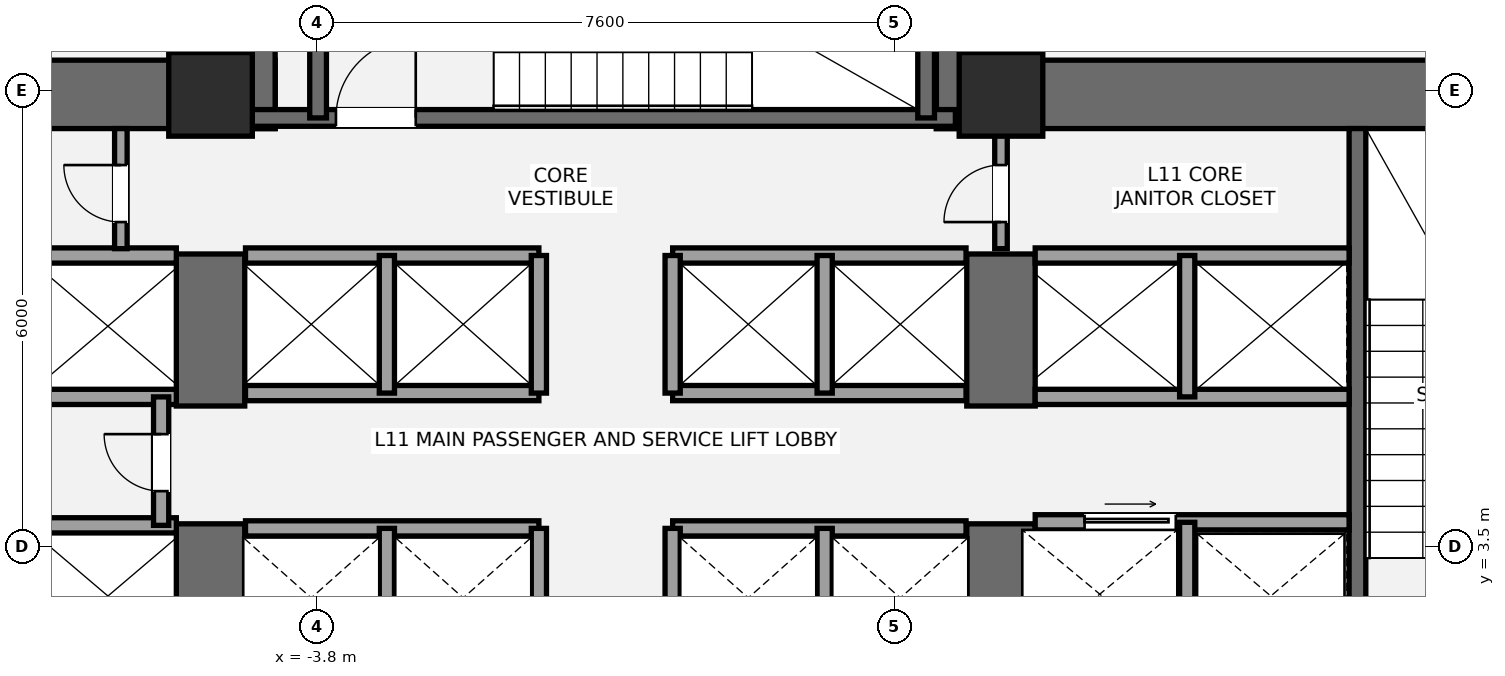
"""IFC4 building model, lengths in metres.
Left out: names, types, materials, properties, quantities, classifications, styles, units other than length and angle.
Written with IfcOpenShell. Run it as: python <this file> out.ifc"""

import sys

from ifc_helpers import new_model, si_unit, direction, frame, frame_2d, origin, origin_2d, place, context, subcontext, project, spatial, rectangle, extrude, element, fill, save


model = new_model("IFC4")
c1 = context("Model", 3, precision=1e-05, world=origin(), true_north=direction((0.0, 1.0)))
c2 = subcontext(c1, "Body", "Model", "MODEL_VIEW")
j1 = project(units=[si_unit("LENGTHUNIT", "METRE"), si_unit("PLANEANGLEUNIT", "RADIAN")], contexts=[c1])
p1 = place(None, origin())
s1 = spatial("IfcSite", under=j1, at=p1, CompositionType="ELEMENT")
p2 = place(p1, origin())
s2 = spatial("IfcBuilding", under=s1, at=p2, CompositionType="ELEMENT")
p3 = place(p2, frame((0.0, 0.0, 45.0)))
s3 = spatial("IfcBuildingStorey", under=s2, at=p3, CompositionType="ELEMENT", Elevation=45.0)
p4 = place(p3, frame((-14.05, 9.45, 0.0), z_axis=(0.0, 0.0, 1.0), x_axis=(1.0, 0.0, 0.0)))
e1 = element("IfcWall", 1, at=p4, inside=s3, PredefinedType="SHEAR", context=c2, shape_type="SweptSolid", body=[
    extrude(rectangle(XDim=9.7, YDim=0.9, at=frame_2d((4.85, 0.0))), origin(), (0.0, 0.0, 1.0), 3.6),
])
p5 = place(p3, frame((-5.2, 0.95, 0.0), z_axis=(0.0, 0.0, 1.0), x_axis=(0.0, 1.0, 0.0)))
e2 = element("IfcWall", 2, at=p5, inside=s3, PredefinedType="SHEAR", context=c2, shape_type="SweptSolid", body=[
    extrude(rectangle(XDim=2.85, YDim=0.9, at=frame_2d((1.425, 0.0))), origin(), (0.0, 0.0, 1.0), 3.6),
])
p6 = place(p3, frame((-5.2, 5.35, 0.0), z_axis=(0.0, 0.0, 1.0), x_axis=(0.0, 1.0, 0.0)))
e3 = element("IfcWall", 3, at=p6, inside=s3, PredefinedType="SHEAR", context=c2, shape_type="SweptSolid", body=[
    extrude(rectangle(XDim=2.0, YDim=0.9, at=frame_2d((1.0, 0.0))), origin(), (0.0, 0.0, 1.0), 3.6),
])
p7 = place(p3, frame((4.35, 9.45, 0.0), z_axis=(0.0, 0.0, 1.0), x_axis=(1.0, 0.0, 0.0)))
e4 = element("IfcWall", 4, at=p7, inside=s3, PredefinedType="SHEAR", context=c2, shape_type="SweptSolid", body=[
    extrude(rectangle(XDim=9.7, YDim=0.9, at=frame_2d((4.85, 0.0))), origin(), (0.0, 0.0, 1.0), 3.6),
])
p8 = place(p3, frame((5.2, 0.95, 0.0), z_axis=(0.0, 0.0, 1.0), x_axis=(0.0, 1.0, 0.0)))
e5 = element("IfcWall", 5, at=p8, inside=s3, PredefinedType="SHEAR", context=c2, shape_type="SweptSolid", body=[
    extrude(rectangle(XDim=2.85, YDim=0.9, at=frame_2d((1.425, 0.0))), origin(), (0.0, 0.0, 1.0), 3.6),
])
p9 = place(p3, frame((5.2, 5.35, 0.0), z_axis=(0.0, 0.0, 1.0), x_axis=(0.0, 1.0, 0.0)))
e6 = element("IfcWall", 6, at=p9, inside=s3, PredefinedType="SHEAR", context=c2, shape_type="SweptSolid", body=[
    extrude(rectangle(XDim=2.0, YDim=0.9, at=frame_2d((1.0, 0.0))), origin(), (0.0, 0.0, 1.0), 3.6),
])
p10 = place(p3, frame((9.89, 1.85, 0.0), z_axis=(0.0, 0.0, 1.0), x_axis=(0.0, 1.0, 0.0)))
e7 = element("IfcWall", 7, at=p10, inside=s3, PredefinedType="SHEAR", context=c2, shape_type="SweptSolid", body=[
    extrude(rectangle(XDim=7.15, YDim=0.22, at=frame_2d((3.575, 0.0))), origin(), (0.0, 0.0, 1.0), 3.6),
])
for number, where, z_axis, x_axis in (
    (8, (-4.8, 9.0, 0.0), (0.0, 0.0, 1.0), (0.0, 1.0, 0.0)),
    (9, (4.8, 9.0, 0.0), (0.0, 0.0, 1.0), (0.0, 1.0, 0.0)),
):
    element("IfcWall", number, at=place(p3, frame(where, z_axis=z_axis, x_axis=x_axis)), inside=s3, PredefinedType="SHEAR", context=c2, shape_type="SweptSolid", body=[
        extrude(rectangle(XDim=4.3, YDim=0.9, at=frame_2d((2.15, 0.0))), origin(), (0.0, 0.0, 1.0), 3.6),
    ])
p11 = place(p3, frame((-4.7, 9.14, 0.0), z_axis=(0.0, 0.0, 1.0), x_axis=(1.0, 0.0, 0.0)))
e10 = element("IfcWall", 10, at=p11, inside=s3, PredefinedType="SHEAR", context=c2, shape_type="SweptSolid", body=[
    extrude(rectangle(XDim=9.3, YDim=0.22, at=frame_2d((4.65, 0.0))), origin(), (0.0, 0.0, 1.0), 3.6),
])
p12 = place(p11, frame((1.15, 0.0, 0.0)))
e11 = element("IfcOpeningElement", 11, at=p12, cuts=e10, PredefinedType="OPENING", context=c2, shape_type="SweptSolid", body=[
    extrude(rectangle(XDim=1.05, YDim=2.15, at=frame_2d((0.525, 1.075))), frame((0.0, 0.12, 0.0), z_axis=(0.0, -1.0, 0.0), x_axis=(1.0, 0.0, 0.0)), (0.0, 0.0, 1.0), 0.24),
])
for number, where, z_axis, x_axis in (
    (12, (-3.785, 9.14, 0.0), (0.0, 0.0, 1.0), (0.0, 1.0, 0.0)),
    (13, (4.215, 9.14, 0.0), (0.0, 0.0, 1.0), (0.0, 1.0, 0.0)),
):
    element("IfcWall", number, at=place(p3, frame(where, z_axis=z_axis, x_axis=x_axis)), inside=s3, PredefinedType="SHEAR", context=c2, shape_type="SweptSolid", body=[
        extrude(rectangle(XDim=3.26, YDim=0.22, at=frame_2d((1.63, 0.0))), origin(), (0.0, 0.0, 1.0), 3.6),
    ])
for number, where, z_axis, x_axis in (
    (14, (-5.2, 9.45, 0.0), (0.0, 0.0, 1.0), (1.0, 0.0, 0.0)),
    (15, (5.2, 9.45, 0.0), (0.0, 0.0, 1.0), (1.0, 0.0, 0.0)),
):
    element("IfcColumn", number, at=place(p3, frame(where, z_axis=z_axis, x_axis=x_axis)), inside=s3, PredefinedType="COLUMN", context=c2, shape_type="SweptSolid", body=[
        extrude(rectangle(XDim=1.1, YDim=1.1, at=origin_2d()), origin(), (0.0, 0.0, 1.0), 3.6),
    ])
for number, where, z_axis, x_axis in (
    (16, (-9.78, 3.78, 0.0), (0.0, 0.0, 1.0), (1.0, 0.0, 0.0)),
    (17, (-9.78, 5.47, 0.0), (0.0, 0.0, 1.0), (1.0, 0.0, 0.0)),
    (18, (-9.78, 7.33, 0.0), (0.0, 0.0, 1.0), (1.0, 0.0, 0.0)),
):
    element("IfcWall", number, at=place(p3, frame(where, z_axis=z_axis, x_axis=x_axis)), inside=s3, PredefinedType="SOLIDWALL", context=c2, shape_type="SweptSolid", body=[
        extrude(rectangle(XDim=4.13, YDim=0.2, at=frame_2d((2.065, 0.0))), origin(), (0.0, 0.0, 1.0), 3.4),
    ])
p13 = place(p3, frame((-5.85, 3.78, 0.0), z_axis=(0.0, 0.0, 1.0), x_axis=(0.0, 1.0, 0.0)))
e19 = element("IfcWall", 19, at=p13, inside=s3, PredefinedType="SOLIDWALL", context=c2, shape_type="SweptSolid", body=[
    extrude(rectangle(XDim=1.69, YDim=0.2, at=frame_2d((0.845, 0.0))), origin(), (0.0, 0.0, 1.0), 3.4),
])
p14 = place(p13, frame((0.45, 0.0, 0.0)))
e20 = element("IfcOpeningElement", 20, at=p14, cuts=e19, PredefinedType="OPENING", context=c2, shape_type="SweptSolid", body=[
    extrude(rectangle(XDim=0.75, YDim=2.1, at=frame_2d((0.375, 1.05))), frame((0.0, 0.11, 0.0), z_axis=(0.0, -1.0, 0.0), x_axis=(1.0, 0.0, 0.0)), (0.0, 0.0, 1.0), 0.22),
])
p15 = place(p3, frame((5.65, 3.82, 0.0), z_axis=(0.0, 0.0, 1.0), x_axis=(1.0, 0.0, 0.0)))
e21 = element("IfcWall", 21, at=p15, inside=s3, PredefinedType="SOLIDWALL", context=c2, shape_type="SweptSolid", body=[
    extrude(rectangle(XDim=4.13, YDim=0.2, at=frame_2d((2.065, 0.0))), origin(), (0.0, 0.0, 1.0), 3.4),
])
p16 = place(p15, frame((0.65, 0.0, 0.0)))
e22 = element("IfcOpeningElement", 22, at=p16, cuts=e21, PredefinedType="OPENING", context=c2, shape_type="SweptSolid", body=[
    extrude(rectangle(XDim=1.2, YDim=2.2, at=frame_2d((0.6, 1.1))), frame((0.0, 0.11, 0.0), z_axis=(0.0, -1.0, 0.0), x_axis=(1.0, 0.0, 0.0)), (0.0, 0.0, 1.0), 0.22),
])
p17 = place(p3, frame((7.65, 1.85, 0.0), z_axis=(0.0, 0.0, 1.0), x_axis=(0.0, 1.0, 0.0)))
e23 = element("IfcWall", 23, at=p17, inside=s3, PredefinedType="SOLIDWALL", context=c2, shape_type="SweptSolid", body=[
    extrude(rectangle(XDim=1.97, YDim=0.2, at=frame_2d((0.985, 0.0))), origin(), (0.0, 0.0, 1.0), 3.4),
])
for number, where, z_axis, x_axis in (
    (24, (5.65, 5.47, 0.0), (0.0, 0.0, 1.0), (1.0, 0.0, 0.0)),
    (25, (5.65, 7.33, 0.0), (0.0, 0.0, 1.0), (1.0, 0.0, 0.0)),
):
    element("IfcWall", number, at=place(p3, frame(where, z_axis=z_axis, x_axis=x_axis)), inside=s3, PredefinedType="SOLIDWALL", context=c2, shape_type="SweptSolid", body=[
        extrude(rectangle(XDim=4.13, YDim=0.2, at=frame_2d((2.065, 0.0))), origin(), (0.0, 0.0, 1.0), 3.4),
    ])
p18 = place(p3, frame((7.65, 5.47, 0.0), z_axis=(0.0, 0.0, 1.0), x_axis=(0.0, 1.0, 0.0)))
e26 = element("IfcWall", 26, at=p18, inside=s3, PredefinedType="SOLIDWALL", context=c2, shape_type="SweptSolid", body=[
    extrude(rectangle(XDim=1.86, YDim=0.2, at=frame_2d((0.93, 0.0))), origin(), (0.0, 0.0, 1.0), 3.4),
])
for number, where, z_axis, x_axis in (
    (27, (-4.74, 3.74, 0.0), (0.0, 0.0, 1.0), (1.0, 0.0, 0.0)),
    (28, (0.88, 3.74, 0.0), (0.0, 0.0, 1.0), (1.0, 0.0, 0.0)),
):
    element("IfcWall", number, at=place(p3, frame(where, z_axis=z_axis, x_axis=x_axis)), inside=s3, PredefinedType="SOLIDWALL", context=c2, shape_type="SweptSolid", body=[
        extrude(rectangle(XDim=3.86, YDim=0.2, at=frame_2d((1.93, 0.0))), origin(), (0.0, 0.0, 1.0), 3.4),
    ])
for number, where, z_axis, x_axis in (
    (29, (-2.88, 1.92, 0.0), (0.0, 0.0, 1.0), (0.0, 1.0, 0.0)),
    (30, (2.88, 1.92, 0.0), (0.0, 0.0, 1.0), (0.0, 1.0, 0.0)),
    (31, (-0.88, 1.92, 0.0), (0.0, 0.0, 1.0), (0.0, 1.0, 0.0)),
    (32, (0.88, 1.92, 0.0), (0.0, 0.0, 1.0), (0.0, 1.0, 0.0)),
):
    element("IfcWall", number, at=place(p3, frame(where, z_axis=z_axis, x_axis=x_axis)), inside=s3, PredefinedType="SOLIDWALL", context=c2, shape_type="SweptSolid", body=[
        extrude(rectangle(XDim=1.82, YDim=0.2, at=frame_2d((0.91, 0.0))), origin(), (0.0, 0.0, 1.0), 3.4),
    ])
for number, where, z_axis, x_axis in (
    (33, (-4.74, 5.52, 0.0), (0.0, 0.0, 1.0), (1.0, 0.0, 0.0)),
    (34, (0.88, 5.52, 0.0), (0.0, 0.0, 1.0), (1.0, 0.0, 0.0)),
    (35, (-4.74, 7.33, 0.0), (0.0, 0.0, 1.0), (1.0, 0.0, 0.0)),
    (36, (0.88, 7.33, 0.0), (0.0, 0.0, 1.0), (1.0, 0.0, 0.0)),
):
    element("IfcWall", number, at=place(p3, frame(where, z_axis=z_axis, x_axis=x_axis)), inside=s3, PredefinedType="SOLIDWALL", context=c2, shape_type="SweptSolid", body=[
        extrude(rectangle(XDim=3.86, YDim=0.2, at=frame_2d((1.93, 0.0))), origin(), (0.0, 0.0, 1.0), 3.4),
    ])
for number, where, z_axis, x_axis in (
    (37, (-2.88, 5.52, 0.0), (0.0, 0.0, 1.0), (0.0, 1.0, 0.0)),
    (38, (2.88, 5.52, 0.0), (0.0, 0.0, 1.0), (0.0, 1.0, 0.0)),
    (39, (-0.88, 5.52, 0.0), (0.0, 0.0, 1.0), (0.0, 1.0, 0.0)),
    (40, (0.88, 5.52, 0.0), (0.0, 0.0, 1.0), (0.0, 1.0, 0.0)),
):
    element("IfcWall", number, at=place(p3, frame(where, z_axis=z_axis, x_axis=x_axis)), inside=s3, PredefinedType="SOLIDWALL", context=c2, shape_type="SweptSolid", body=[
        extrude(rectangle(XDim=1.81, YDim=0.2, at=frame_2d((0.905, 0.0))), origin(), (0.0, 0.0, 1.0), 3.4),
    ])
p19 = place(p3, frame((-6.38, 7.42, 0.0), z_axis=(0.0, 0.0, 1.0), x_axis=(0.0, 1.0, 0.0)))
e41 = element("IfcWall", 41, at=p19, inside=s3, PredefinedType="PARTITIONING", context=c2, shape_type="SweptSolid", body=[
    extrude(rectangle(XDim=1.58, YDim=0.165, at=frame_2d((0.79, 0.0))), origin(), (0.0, 0.0, 1.0), 3.4),
])
p20 = place(p19, frame((0.35, 0.0, 0.0)))
e42 = element("IfcOpeningElement", 42, at=p20, cuts=e41, PredefinedType="OPENING", context=c2, shape_type="SweptSolid", body=[
    extrude(rectangle(XDim=0.75, YDim=2.1, at=frame_2d((0.375, 1.05))), frame((0.0, 0.093, 0.0), z_axis=(0.0, -1.0, 0.0), x_axis=(1.0, 0.0, 0.0)), (0.0, 0.0, 1.0), 0.185),
])
p21 = place(p3, frame((5.2, 7.42, 0.0), z_axis=(0.0, 0.0, 1.0), x_axis=(0.0, 1.0, 0.0)))
e43 = element("IfcWall", 43, at=p21, inside=s3, PredefinedType="PARTITIONING", context=c2, shape_type="SweptSolid", body=[
    extrude(rectangle(XDim=1.58, YDim=0.165, at=frame_2d((0.79, 0.0))), origin(), (0.0, 0.0, 1.0), 3.4),
])
p22 = place(p21, frame((0.35, 0.0, 0.0)))
e44 = element("IfcOpeningElement", 44, at=p22, cuts=e43, PredefinedType="OPENING", context=c2, shape_type="SweptSolid", body=[
    extrude(rectangle(XDim=0.75, YDim=2.1, at=frame_2d((0.375, 1.05))), frame((0.0, 0.093, 0.0), z_axis=(0.0, -1.0, 0.0), x_axis=(1.0, 0.0, 0.0)), (0.0, 0.0, 1.0), 0.185),
])
p23 = place(p12, origin())
e45 = element("IfcDoor", 45, at=p23, inside=s3, OperationType="SINGLE_SWING_RIGHT", PredefinedType="DOOR", context=c2, shape_type="SweptSolid", body=[
    extrude(rectangle(XDim=1.05, YDim=2.15, at=frame_2d((0.525, 1.075))), frame((0.0, 0.025, 0.0), z_axis=(0.0, -1.0, 0.0), x_axis=(1.0, 0.0, 0.0)), (0.0, 0.0, 1.0), 0.05),
])
fill(e11, e45)
p24 = place(p14, origin())
e46 = element("IfcDoor", 46, at=p24, inside=s3, OperationType="SINGLE_SWING_RIGHT", PredefinedType="DOOR", context=c2, shape_type="SweptSolid", body=[
    extrude(rectangle(XDim=0.75, YDim=2.1, at=frame_2d((0.375, 1.05))), frame((0.0, 0.025, 0.0), z_axis=(0.0, -1.0, 0.0), x_axis=(1.0, 0.0, 0.0)), (0.0, 0.0, 1.0), 0.05),
])
fill(e20, e46)
p25 = place(p16, origin())
e47 = element("IfcDoor", 47, at=p25, inside=s3, OperationType="SLIDING_TO_RIGHT", PredefinedType="DOOR", context=c2, shape_type="SweptSolid", body=[
    extrude(rectangle(XDim=1.2, YDim=2.2, at=frame_2d((0.6, 1.1))), frame((0.0, 0.025, 0.0), z_axis=(0.0, -1.0, 0.0), x_axis=(1.0, 0.0, 0.0)), (0.0, 0.0, 1.0), 0.05),
])
fill(e22, e47)
p26 = place(p20, origin())
e48 = element("IfcDoor", 48, at=p26, inside=s3, OperationType="SINGLE_SWING_RIGHT", PredefinedType="DOOR", context=c2, shape_type="SweptSolid", body=[
    extrude(rectangle(XDim=0.75, YDim=2.1, at=frame_2d((0.375, 1.05))), frame((0.0, 0.025, 0.0), z_axis=(0.0, -1.0, 0.0), x_axis=(1.0, 0.0, 0.0)), (0.0, 0.0, 1.0), 0.05),
])
fill(e42, e48)
p27 = place(p22, origin())
e49 = element("IfcDoor", 49, at=p27, inside=s3, OperationType="SINGLE_SWING_LEFT", PredefinedType="DOOR", context=c2, shape_type="SweptSolid", body=[
    extrude(rectangle(XDim=0.75, YDim=2.1, at=frame_2d((0.375, 1.05))), frame((0.0, 0.025, 0.0), z_axis=(0.0, -1.0, 0.0), x_axis=(1.0, 0.0, 0.0)), (0.0, 0.0, 1.0), 0.05),
])
fill(e44, e49)
save(model, sys.argv[1])
